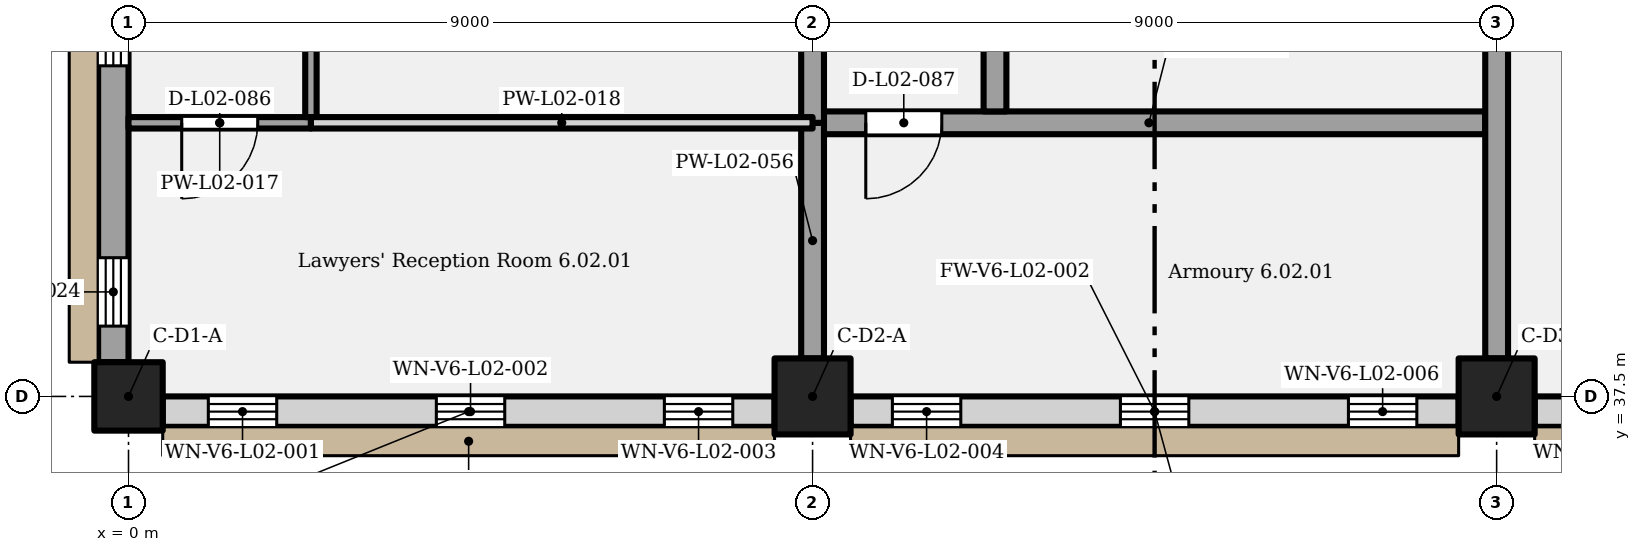
"""IFC4 building model, lengths in metres.
Left out: names, types, materials, properties, quantities, classifications, styles, units other than length and angle.
Written with IfcOpenShell. Run it as: python <this file> out.ifc"""

import sys

from ifc_helpers import new_model, si_unit, direction, frame, frame_2d, origin, origin_2d, place, context, subcontext, project, spatial, rectangle, extrude, element, fill, save


model = new_model("IFC4")
c1 = context("Model", 3, precision=1e-05, world=origin(), true_north=direction((0.0, 1.0)))
c2 = subcontext(c1, "Body", "Model", "MODEL_VIEW")
j1 = project(units=[si_unit("LENGTHUNIT", "METRE"), si_unit("PLANEANGLEUNIT", "RADIAN")], contexts=[c1])
p1 = place(None, origin())
s1 = spatial("IfcSite", under=j1, at=p1, CompositionType="ELEMENT")
p2 = place(p1, origin())
s2 = spatial("IfcBuilding", under=s1, at=p2, CompositionType="ELEMENT")
p3 = place(p2, frame((0.0, 0.0, 12.0)))
s3 = spatial("IfcBuildingStorey", under=s2, at=p3, CompositionType="ELEMENT", Elevation=12.0)
p4 = place(p3, frame((0.0, 37.5, 0.0), z_axis=(0.0, 0.0, 1.0), x_axis=(1.0, 0.0, 0.0)))
e1 = element("IfcColumn", 1, at=p4, inside=s3, PredefinedType="COLUMN", context=c2, shape_type="SweptSolid", body=[
    extrude(rectangle(XDim=0.9, YDim=0.9, at=origin_2d()), origin(), (0.0, 0.0, 1.0), 5.4),
])
for number, where, z_axis, x_axis in (
    (2, (9.0, 37.5, 0.0), (0.0, 0.0, 1.0), (1.0, 0.0, 0.0)),
    (3, (18.0, 37.5, 0.0), (0.0, 0.0, 1.0), (1.0, 0.0, 0.0)),
):
    element("IfcColumn", number, at=place(p3, frame(where, z_axis=z_axis, x_axis=x_axis)), inside=s3, PredefinedType="COLUMN", context=c2, shape_type="SweptSolid", body=[
        extrude(rectangle(XDim=1.0, YDim=1.0, at=origin_2d()), origin(), (0.0, 0.0, 1.0), 5.4),
    ])
p5 = place(p3, frame((0.45, 37.3, 0.0), z_axis=(0.0, 0.0, 1.0), x_axis=(1.0, 0.0, 0.0)))
e4 = element("IfcWall", 4, at=p5, inside=s3, PredefinedType="SOLIDWALL", context=c2, shape_type="SweptSolid", body=[
    extrude(rectangle(XDim=8.05, YDim=0.4, at=frame_2d((4.025, 0.0))), origin(), (0.0, 0.0, 1.0), 5.15),
])
p6 = place(p5, frame((0.6, 0.0, 1.5)))
e5 = element("IfcOpeningElement", 5, at=p6, cuts=e4, PredefinedType="OPENING", context=c2, shape_type="SweptSolid", body=[
    extrude(rectangle(XDim=0.9, YDim=1.8, at=frame_2d((0.45, 0.9))), frame((0.0, 0.21, 0.0), z_axis=(0.0, -1.0, 0.0), x_axis=(1.0, 0.0, 0.0)), (0.0, 0.0, 1.0), 0.42),
])
p7 = place(p5, frame((3.6, 0.0, 1.5)))
e6 = element("IfcOpeningElement", 6, at=p7, cuts=e4, PredefinedType="OPENING", context=c2, shape_type="SweptSolid", body=[
    extrude(rectangle(XDim=0.9, YDim=1.8, at=frame_2d((0.45, 0.9))), frame((0.0, 0.21, 0.0), z_axis=(0.0, -1.0, 0.0), x_axis=(1.0, 0.0, 0.0)), (0.0, 0.0, 1.0), 0.42),
])
p8 = place(p5, frame((6.6, 0.0, 1.5)))
e7 = element("IfcOpeningElement", 7, at=p8, cuts=e4, PredefinedType="OPENING", context=c2, shape_type="SweptSolid", body=[
    extrude(rectangle(XDim=0.9, YDim=1.8, at=frame_2d((0.45, 0.9))), frame((0.0, 0.21, 0.0), z_axis=(0.0, -1.0, 0.0), x_axis=(1.0, 0.0, 0.0)), (0.0, 0.0, 1.0), 0.42),
])
p9 = place(p3, frame((9.5, 37.3, 0.0), z_axis=(0.0, 0.0, 1.0), x_axis=(1.0, 0.0, 0.0)))
e8 = element("IfcWall", 8, at=p9, inside=s3, PredefinedType="SOLIDWALL", context=c2, shape_type="SweptSolid", body=[
    extrude(rectangle(XDim=8.0, YDim=0.4, at=frame_2d((4.0, 0.0))), origin(), (0.0, 0.0, 1.0), 5.15),
])
p10 = place(p9, frame((0.55, 0.0, 1.5)))
e9 = element("IfcOpeningElement", 9, at=p10, cuts=e8, PredefinedType="OPENING", context=c2, shape_type="SweptSolid", body=[
    extrude(rectangle(XDim=0.9, YDim=1.8, at=frame_2d((0.45, 0.9))), frame((0.0, 0.21, 0.0), z_axis=(0.0, -1.0, 0.0), x_axis=(1.0, 0.0, 0.0)), (0.0, 0.0, 1.0), 0.42),
])
p11 = place(p9, frame((3.55, 0.0, 1.5)))
e10 = element("IfcOpeningElement", 10, at=p11, cuts=e8, PredefinedType="OPENING", context=c2, shape_type="SweptSolid", body=[
    extrude(rectangle(XDim=0.9, YDim=1.8, at=frame_2d((0.45, 0.9))), frame((0.0, 0.21, 0.0), z_axis=(0.0, -1.0, 0.0), x_axis=(1.0, 0.0, 0.0)), (0.0, 0.0, 1.0), 0.42),
])
p12 = place(p9, frame((6.55, 0.0, 1.5)))
e11 = element("IfcOpeningElement", 11, at=p12, cuts=e8, PredefinedType="OPENING", context=c2, shape_type="SweptSolid", body=[
    extrude(rectangle(XDim=0.9, YDim=1.8, at=frame_2d((0.45, 0.9))), frame((0.0, 0.21, 0.0), z_axis=(0.0, -1.0, 0.0), x_axis=(1.0, 0.0, 0.0)), (0.0, 0.0, 1.0), 0.42),
])
p13 = place(p3, frame((18.5, 37.3, 0.0), z_axis=(0.0, 0.0, 1.0), x_axis=(1.0, 0.0, 0.0)))
e12 = element("IfcWall", 12, at=p13, inside=s3, PredefinedType="SOLIDWALL", context=c2, shape_type="SweptSolid", body=[
    extrude(rectangle(XDim=8.0, YDim=0.4, at=frame_2d((4.0, 0.0))), origin(), (0.0, 0.0, 1.0), 5.15),
])
p14 = place(p13, frame((0.55, 0.0, 1.5)))
e13 = element("IfcOpeningElement", 13, at=p14, cuts=e12, PredefinedType="OPENING", context=c2, shape_type="SweptSolid", body=[
    extrude(rectangle(XDim=0.9, YDim=1.8, at=frame_2d((0.45, 0.9))), frame((0.0, 0.21, 0.0), z_axis=(0.0, -1.0, 0.0), x_axis=(1.0, 0.0, 0.0)), (0.0, 0.0, 1.0), 0.42),
])
p15 = place(p13, frame((3.55, 0.0, 1.5)))
e14 = element("IfcOpeningElement", 14, at=p15, cuts=e12, PredefinedType="OPENING", context=c2, shape_type="SweptSolid", body=[
    extrude(rectangle(XDim=0.9, YDim=1.8, at=frame_2d((0.45, 0.9))), frame((0.0, 0.21, 0.0), z_axis=(0.0, -1.0, 0.0), x_axis=(1.0, 0.0, 0.0)), (0.0, 0.0, 1.0), 0.42),
])
p16 = place(p13, frame((6.55, 0.0, 1.5)))
e15 = element("IfcOpeningElement", 15, at=p16, cuts=e12, PredefinedType="OPENING", context=c2, shape_type="SweptSolid", body=[
    extrude(rectangle(XDim=0.9, YDim=1.8, at=frame_2d((0.45, 0.9))), frame((0.0, 0.21, 0.0), z_axis=(0.0, -1.0, 0.0), x_axis=(1.0, 0.0, 0.0)), (0.0, 0.0, 1.0), 0.42),
])
p17 = place(p3, frame((-0.2, 37.95, 0.0), z_axis=(0.0, 0.0, 1.0), x_axis=(0.0, 1.0, 0.0)))
e16 = element("IfcWall", 16, at=p17, inside=s3, PredefinedType="SOLIDWALL", context=c2, shape_type="SweptSolid", body=[
    extrude(rectangle(XDim=15.6, YDim=0.4, at=frame_2d((7.8, 0.0))), origin(), (0.0, 0.0, 1.0), 5.15),
])
p18 = place(p17, frame((3.9, 0.0, 0.9)))
e17 = element("IfcOpeningElement", 17, at=p18, cuts=e16, PredefinedType="OPENING", context=c2, shape_type="SweptSolid", body=[
    extrude(rectangle(XDim=1.2, YDim=2.4, at=frame_2d((0.6, 1.2))), frame((0.0, 0.21, 0.0), z_axis=(0.0, -1.0, 0.0), x_axis=(1.0, 0.0, 0.0)), (0.0, 0.0, 1.0), 0.42),
])
p19 = place(p17, frame((7.2, 0.0, 0.9)))
e18 = element("IfcOpeningElement", 18, at=p19, cuts=e16, PredefinedType="OPENING", context=c2, shape_type="SweptSolid", body=[
    extrude(rectangle(XDim=1.2, YDim=2.4, at=frame_2d((0.6, 1.2))), frame((0.0, 0.21, 0.0), z_axis=(0.0, -1.0, 0.0), x_axis=(1.0, 0.0, 0.0)), (0.0, 0.0, 1.0), 0.42),
])
p20 = place(p17, frame((10.5, 0.0, 0.9)))
e19 = element("IfcOpeningElement", 19, at=p20, cuts=e16, PredefinedType="OPENING", context=c2, shape_type="SweptSolid", body=[
    extrude(rectangle(XDim=1.2, YDim=2.4, at=frame_2d((0.6, 1.2))), frame((0.0, 0.21, 0.0), z_axis=(0.0, -1.0, 0.0), x_axis=(1.0, 0.0, 0.0)), (0.0, 0.0, 1.0), 0.42),
])
p21 = place(p17, frame((13.8, 0.0, 0.9)))
e20 = element("IfcOpeningElement", 20, at=p21, cuts=e16, PredefinedType="OPENING", context=c2, shape_type="SweptSolid", body=[
    extrude(rectangle(XDim=1.2, YDim=2.4, at=frame_2d((0.6, 1.2))), frame((0.0, 0.21, 0.0), z_axis=(0.0, -1.0, 0.0), x_axis=(1.0, 0.0, 0.0)), (0.0, 0.0, 1.0), 0.42),
])
p22 = place(p17, frame((0.475, 0.0, 1.5)))
e21 = element("IfcOpeningElement", 21, at=p22, cuts=e16, PredefinedType="OPENING", context=c2, shape_type="SweptSolid", body=[
    extrude(rectangle(XDim=0.9, YDim=1.8, at=frame_2d((0.45, 0.9))), frame((0.0, 0.21, 0.0), z_axis=(0.0, -1.0, 0.0), x_axis=(1.0, 0.0, 0.0)), (0.0, 0.0, 1.0), 0.42),
])
p23 = place(p3, frame((0.0, 41.1, 0.0), z_axis=(0.0, 0.0, 1.0), x_axis=(1.0, 0.0, 0.0)))
e22 = element("IfcWall", 22, at=p23, inside=s3, PredefinedType="PARTITIONING", context=c2, shape_type="SweptSolid", body=[
    extrude(rectangle(XDim=2.4, YDim=0.15, at=frame_2d((1.2, 0.0))), origin(), (0.0, 0.0, 1.0), 5.15),
])
p24 = place(p23, frame((1.7, 0.0, 0.0), z_axis=(0.0, 0.0, 1.0), x_axis=(-1.0, 0.0, 0.0)))
e23 = element("IfcOpeningElement", 23, at=p24, cuts=e22, PredefinedType="OPENING", context=c2, shape_type="SweptSolid", body=[
    extrude(rectangle(XDim=1.0, YDim=2.1, at=frame_2d((0.5, 1.05))), frame((0.0, 0.085, 0.0), z_axis=(0.0, -1.0, 0.0), x_axis=(1.0, 0.0, 0.0)), (0.0, 0.0, 1.0), 0.17),
])
p25 = place(p3, frame((2.4, 41.1, 0.0), z_axis=(0.0, 0.0, 1.0), x_axis=(1.0, 0.0, 0.0)))
e24 = element("IfcWall", 24, at=p25, inside=s3, PredefinedType="PARTITIONING", context=c2, shape_type="SweptSolid", body=[
    extrude(rectangle(XDim=6.6, YDim=0.15, at=frame_2d((3.3, 0.0))), origin(), (0.0, 0.0, 1.0), 5.15),
])
p26 = place(p3, frame((9.0, 41.1, 0.0), z_axis=(0.0, 0.0, 1.0), x_axis=(1.0, 0.0, 0.0)))
e25 = element("IfcWall", 25, at=p26, inside=s3, PredefinedType="PARTITIONING", context=c2, shape_type="SweptSolid", body=[
    extrude(rectangle(XDim=8.85, YDim=0.3, at=frame_2d((4.425, 0.0))), origin(), (0.0, 0.0, 1.0), 5.15),
])
p27 = place(p26, frame((1.7, 0.0, 0.0), z_axis=(0.0, 0.0, 1.0), x_axis=(-1.0, 0.0, 0.0)))
e26 = element("IfcOpeningElement", 26, at=p27, cuts=e25, PredefinedType="OPENING", context=c2, shape_type="SweptSolid", body=[
    extrude(rectangle(XDim=1.0, YDim=2.1, at=frame_2d((0.5, 1.05))), frame((0.0, 0.16, 0.0), z_axis=(0.0, -1.0, 0.0), x_axis=(1.0, 0.0, 0.0)), (0.0, 0.0, 1.0), 0.32),
])
p28 = place(p3, frame((2.4, 41.175, 0.0), z_axis=(0.0, 0.0, 1.0), x_axis=(0.0, 1.0, 0.0)))
e27 = element("IfcWall", 27, at=p28, inside=s3, PredefinedType="PARTITIONING", context=c2, shape_type="SweptSolid", body=[
    extrude(rectangle(XDim=13.35, YDim=0.15, at=frame_2d((6.675, 0.0))), origin(), (0.0, 0.0, 1.0), 5.15),
])
p29 = place(p28, frame((11.675, 0.0, 0.0), z_axis=(0.0, 0.0, 1.0), x_axis=(-1.0, 0.0, 0.0)))
e28 = element("IfcOpeningElement", 28, at=p29, cuts=e27, PredefinedType="OPENING", context=c2, shape_type="SweptSolid", body=[
    extrude(rectangle(XDim=1.0, YDim=2.1, at=frame_2d((0.5, 1.05))), frame((0.0, 0.085, 0.0), z_axis=(0.0, -1.0, 0.0), x_axis=(1.0, 0.0, 0.0)), (0.0, 0.0, 1.0), 0.17),
])
p30 = place(p28, frame((7.175, 0.0, 0.0), z_axis=(0.0, 0.0, 1.0), x_axis=(-1.0, 0.0, 0.0)))
e29 = element("IfcOpeningElement", 29, at=p30, cuts=e27, PredefinedType="OPENING", context=c2, shape_type="SweptSolid", body=[
    extrude(rectangle(XDim=1.0, YDim=2.1, at=frame_2d((0.5, 1.05))), frame((0.0, 0.085, 0.0), z_axis=(0.0, -1.0, 0.0), x_axis=(1.0, 0.0, 0.0)), (0.0, 0.0, 1.0), 0.17),
])
p31 = place(p28, frame((2.675, 0.0, 0.0), z_axis=(0.0, 0.0, 1.0), x_axis=(-1.0, 0.0, 0.0)))
e30 = element("IfcOpeningElement", 30, at=p31, cuts=e27, PredefinedType="OPENING", context=c2, shape_type="SweptSolid", body=[
    extrude(rectangle(XDim=1.0, YDim=2.1, at=frame_2d((0.5, 1.05))), frame((0.0, 0.085, 0.0), z_axis=(0.0, -1.0, 0.0), x_axis=(1.0, 0.0, 0.0)), (0.0, 0.0, 1.0), 0.17),
])
p32 = place(p3, frame((9.0, 38.0, 0.0), z_axis=(0.0, 0.0, 1.0), x_axis=(0.0, 1.0, 0.0)))
e31 = element("IfcWall", 31, at=p32, inside=s3, PredefinedType="PARTITIONING", context=c2, shape_type="SweptSolid", body=[
    extrude(rectangle(XDim=3.1, YDim=0.3, at=frame_2d((1.55, 0.0))), origin(), (0.0, 0.0, 1.0), 4.2),
])
p33 = place(p3, frame((9.0, 41.1, 0.0), z_axis=(0.0, 0.0, 1.0), x_axis=(0.0, 1.0, 0.0)))
e32 = element("IfcWall", 32, at=p33, inside=s3, PredefinedType="PARTITIONING", context=c2, shape_type="SweptSolid", body=[
    extrude(rectangle(XDim=12.4, YDim=0.3, at=frame_2d((6.2, 0.0))), origin(), (0.0, 0.0, 1.0), 4.2),
])
p34 = place(p3, frame((11.4, 41.25, 0.0), z_axis=(0.0, 0.0, 1.0), x_axis=(0.0, 1.0, 0.0)))
e33 = element("IfcWall", 33, at=p34, inside=s3, PredefinedType="PARTITIONING", context=c2, shape_type="SweptSolid", body=[
    extrude(rectangle(XDim=13.2, YDim=0.3, at=frame_2d((6.6, 0.0))), origin(), (0.0, 0.0, 1.0), 5.15),
])
p35 = place(p34, frame((10.5, 0.0, 0.0), z_axis=(0.0, 0.0, 1.0), x_axis=(-1.0, 0.0, 0.0)))
e34 = element("IfcOpeningElement", 34, at=p35, cuts=e33, PredefinedType="OPENING", context=c2, shape_type="SweptSolid", body=[
    extrude(rectangle(XDim=0.9, YDim=2.0, at=frame_2d((0.45, 1.0))), frame((0.0, 0.16, 0.0), z_axis=(0.0, -1.0, 0.0), x_axis=(1.0, 0.0, 0.0)), (0.0, 0.0, 1.0), 0.32),
])
p36 = place(p34, frame((3.75, 0.0, 0.0), z_axis=(0.0, 0.0, 1.0), x_axis=(-1.0, 0.0, 0.0)))
e35 = element("IfcOpeningElement", 35, at=p36, cuts=e33, PredefinedType="OPENING", context=c2, shape_type="SweptSolid", body=[
    extrude(rectangle(XDim=0.9, YDim=2.0, at=frame_2d((0.45, 1.0))), frame((0.0, 0.16, 0.0), z_axis=(0.0, -1.0, 0.0), x_axis=(1.0, 0.0, 0.0)), (0.0, 0.0, 1.0), 0.32),
])
p37 = place(p3, frame((18.0, 38.0, 0.0), z_axis=(0.0, 0.0, 1.0), x_axis=(0.0, 1.0, 0.0)))
e36 = element("IfcWall", 36, at=p37, inside=s3, PredefinedType="PARTITIONING", context=c2, shape_type="SweptSolid", body=[
    extrude(rectangle(XDim=15.5, YDim=0.3, at=frame_2d((7.75, 0.0))), origin(), (0.0, 0.0, 1.0), 4.2),
])
p38 = place(p6, origin())
e37 = element("IfcWindow", 37, at=p38, inside=s3, PartitioningType="SINGLE_PANEL", PredefinedType="WINDOW", context=c2, shape_type="SweptSolid", body=[
    extrude(rectangle(XDim=0.9, YDim=1.8, at=frame_2d((0.45, 0.9))), frame((0.0, 0.03, 0.0), z_axis=(0.0, -1.0, 0.0), x_axis=(1.0, 0.0, 0.0)), (0.0, 0.0, 1.0), 0.06),
])
fill(e5, e37)
p39 = place(p7, origin())
e38 = element("IfcWindow", 38, at=p39, inside=s3, PartitioningType="SINGLE_PANEL", PredefinedType="WINDOW", context=c2, shape_type="SweptSolid", body=[
    extrude(rectangle(XDim=0.9, YDim=1.8, at=frame_2d((0.45, 0.9))), frame((0.0, 0.03, 0.0), z_axis=(0.0, -1.0, 0.0), x_axis=(1.0, 0.0, 0.0)), (0.0, 0.0, 1.0), 0.06),
])
fill(e6, e38)
p40 = place(p8, origin())
e39 = element("IfcWindow", 39, at=p40, inside=s3, PartitioningType="SINGLE_PANEL", PredefinedType="WINDOW", context=c2, shape_type="SweptSolid", body=[
    extrude(rectangle(XDim=0.9, YDim=1.8, at=frame_2d((0.45, 0.9))), frame((0.0, 0.03, 0.0), z_axis=(0.0, -1.0, 0.0), x_axis=(1.0, 0.0, 0.0)), (0.0, 0.0, 1.0), 0.06),
])
fill(e7, e39)
p41 = place(p10, origin())
e40 = element("IfcWindow", 40, at=p41, inside=s3, PartitioningType="SINGLE_PANEL", PredefinedType="WINDOW", context=c2, shape_type="SweptSolid", body=[
    extrude(rectangle(XDim=0.9, YDim=1.8, at=frame_2d((0.45, 0.9))), frame((0.0, 0.03, 0.0), z_axis=(0.0, -1.0, 0.0), x_axis=(1.0, 0.0, 0.0)), (0.0, 0.0, 1.0), 0.06),
])
fill(e9, e40)
p42 = place(p11, origin())
e41 = element("IfcWindow", 41, at=p42, inside=s3, PartitioningType="SINGLE_PANEL", PredefinedType="WINDOW", context=c2, shape_type="SweptSolid", body=[
    extrude(rectangle(XDim=0.9, YDim=1.8, at=frame_2d((0.45, 0.9))), frame((0.0, 0.03, 0.0), z_axis=(0.0, -1.0, 0.0), x_axis=(1.0, 0.0, 0.0)), (0.0, 0.0, 1.0), 0.06),
])
fill(e10, e41)
p43 = place(p12, origin())
e42 = element("IfcWindow", 42, at=p43, inside=s3, PartitioningType="SINGLE_PANEL", PredefinedType="WINDOW", context=c2, shape_type="SweptSolid", body=[
    extrude(rectangle(XDim=0.9, YDim=1.8, at=frame_2d((0.45, 0.9))), frame((0.0, 0.03, 0.0), z_axis=(0.0, -1.0, 0.0), x_axis=(1.0, 0.0, 0.0)), (0.0, 0.0, 1.0), 0.06),
])
fill(e11, e42)
p44 = place(p18, origin())
e43 = element("IfcWindow", 43, at=p44, inside=s3, PartitioningType="SINGLE_PANEL", PredefinedType="WINDOW", context=c2, shape_type="SweptSolid", body=[
    extrude(rectangle(XDim=1.2, YDim=2.4, at=frame_2d((0.6, 1.2))), frame((0.0, 0.03, 0.0), z_axis=(0.0, -1.0, 0.0), x_axis=(1.0, 0.0, 0.0)), (0.0, 0.0, 1.0), 0.06),
])
fill(e17, e43)
p45 = place(p22, origin())
e44 = element("IfcWindow", 44, at=p45, inside=s3, PartitioningType="SINGLE_PANEL", PredefinedType="WINDOW", context=c2, shape_type="SweptSolid", body=[
    extrude(rectangle(XDim=0.9, YDim=1.8, at=frame_2d((0.45, 0.9))), frame((0.0, 0.03, 0.0), z_axis=(0.0, -1.0, 0.0), x_axis=(1.0, 0.0, 0.0)), (0.0, 0.0, 1.0), 0.06),
])
fill(e21, e44)
p46 = place(p24, origin())
e45 = element("IfcDoor", 45, at=p46, inside=s3, OperationType="SINGLE_SWING_RIGHT", PredefinedType="DOOR", context=c2, shape_type="SweptSolid", body=[
    extrude(rectangle(XDim=1.0, YDim=2.1, at=frame_2d((0.5, 1.05))), frame((0.0, 0.025, 0.0), z_axis=(0.0, -1.0, 0.0), x_axis=(1.0, 0.0, 0.0)), (0.0, 0.0, 1.0), 0.05),
])
fill(e23, e45)
p47 = place(p27, origin())
e46 = element("IfcDoor", 46, at=p47, inside=s3, OperationType="SINGLE_SWING_RIGHT", PredefinedType="DOOR", context=c2, shape_type="SweptSolid", body=[
    extrude(rectangle(XDim=1.0, YDim=2.1, at=frame_2d((0.5, 1.05))), frame((0.0, 0.025, 0.0), z_axis=(0.0, -1.0, 0.0), x_axis=(1.0, 0.0, 0.0)), (0.0, 0.0, 1.0), 0.05),
])
fill(e26, e46)
save(model, sys.argv[1])
